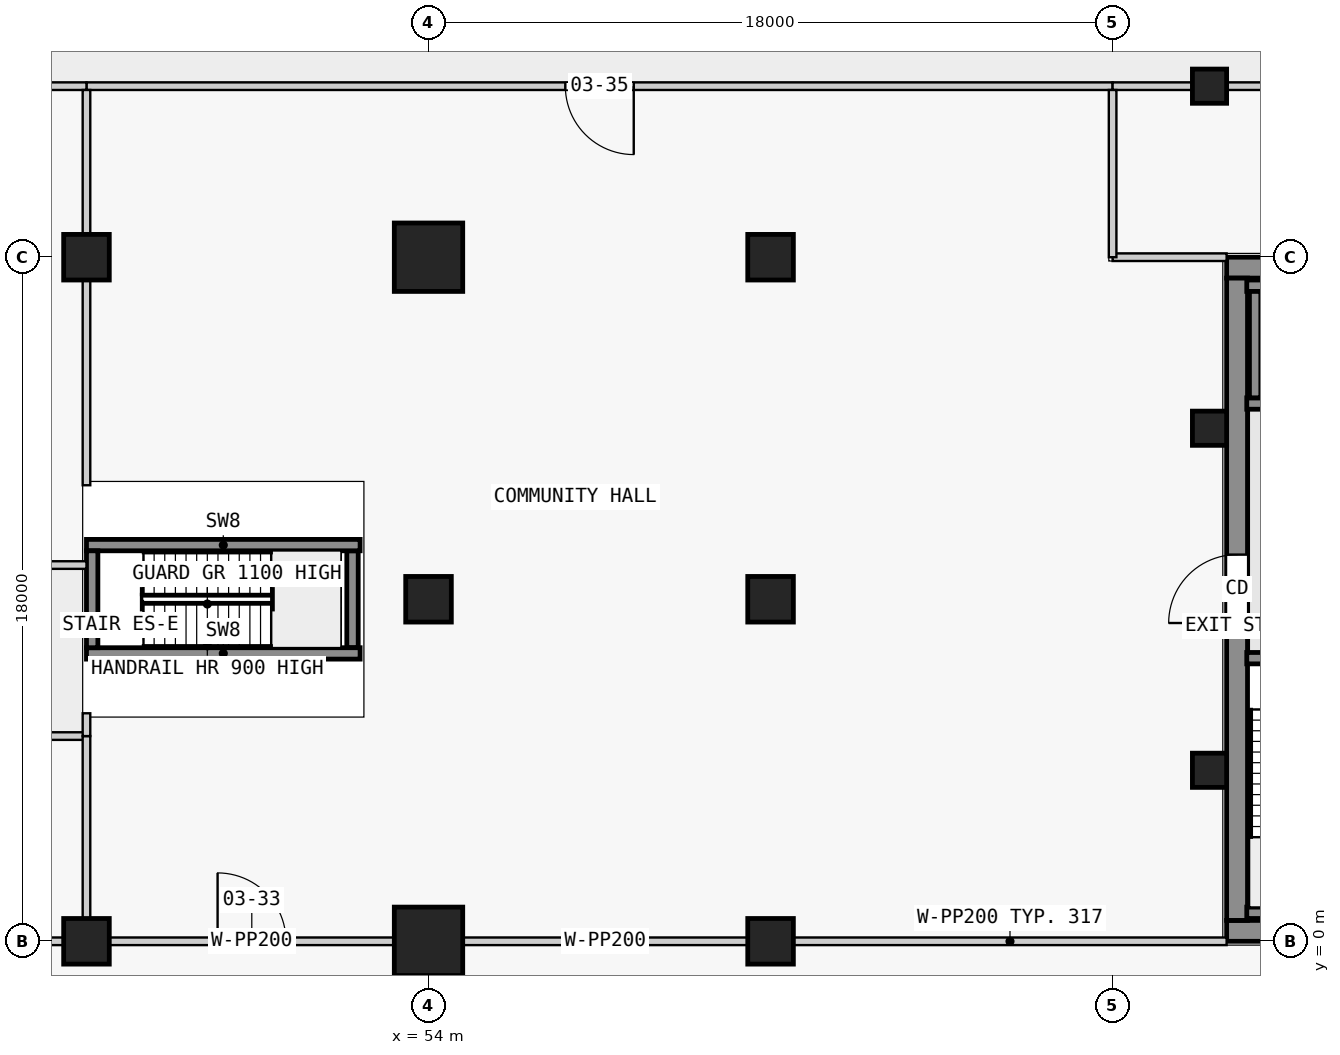
"""IFC4 building model, lengths in metres.
Left out: names, types, materials, properties, quantities, classifications, styles, units other than length and angle.
Written with IfcOpenShell. Run it as: python <this file> out.ifc"""

import sys

from ifc_helpers import new_model, si_unit, direction, frame, frame_2d, origin, origin_2d, place, context, subcontext, project, spatial, rectangle, extrude, element, fill, save


model = new_model("IFC4")
c1 = context("Model", 3, precision=1e-05, world=origin(), true_north=direction((0.0, 1.0)))
c2 = subcontext(c1, "Body", "Model", "MODEL_VIEW")
j1 = project(units=[si_unit("LENGTHUNIT", "METRE"), si_unit("PLANEANGLEUNIT", "RADIAN")], contexts=[c1])
p1 = place(None, origin())
s1 = spatial("IfcSite", under=j1, at=p1, CompositionType="ELEMENT")
p2 = place(p1, origin())
s2 = spatial("IfcBuilding", under=s1, at=p2, CompositionType="ELEMENT")
p3 = place(p2, frame((0.0, 0.0, 17.3)))
s3 = spatial("IfcBuildingStorey", under=s2, at=p3, CompositionType="ELEMENT", Elevation=17.3)
for number, where, z_axis, x_axis in (
    (1, (45.0, 0.0, 0.0), (0.0, 0.0, 1.0), (1.0, 0.0, 0.0)),
    (2, (45.0, 18.0, 0.0), (0.0, 0.0, 1.0), (1.0, 0.0, 0.0)),
):
    element("IfcColumn", number, at=place(p3, frame(where, z_axis=z_axis, x_axis=x_axis)), inside=s3, PredefinedType="COLUMN", context=c2, shape_type="SweptSolid", body=[
        extrude(rectangle(XDim=1.2, YDim=1.2, at=origin_2d()), origin(), (0.0, 0.0, 1.0), 4.5),
    ])
p4 = place(p3, frame((54.0, 0.0, 0.0), z_axis=(0.0, 0.0, 1.0), x_axis=(1.0, 0.0, 0.0)))
e3 = element("IfcColumn", 3, at=p4, inside=s3, PredefinedType="COLUMN", context=c2, shape_type="SweptSolid", body=[
    extrude(rectangle(XDim=1.8, YDim=1.8, at=origin_2d()), origin(), (0.0, 0.0, 1.0), 4.5),
])
p5 = place(p3, frame((54.0, 9.0, 0.0), z_axis=(0.0, 0.0, 1.0), x_axis=(1.0, 0.0, 0.0)))
e4 = element("IfcColumn", 4, at=p5, inside=s3, PredefinedType="COLUMN", context=c2, shape_type="SweptSolid", body=[
    extrude(rectangle(XDim=1.2, YDim=1.2, at=origin_2d()), origin(), (0.0, 0.0, 1.0), 4.5),
])
p6 = place(p3, frame((54.0, 18.0, 0.0), z_axis=(0.0, 0.0, 1.0), x_axis=(1.0, 0.0, 0.0)))
e5 = element("IfcColumn", 5, at=p6, inside=s3, PredefinedType="COLUMN", context=c2, shape_type="SweptSolid", body=[
    extrude(rectangle(XDim=1.8, YDim=1.8, at=origin_2d()), origin(), (0.0, 0.0, 1.0), 4.5),
])
for number, where, z_axis, x_axis in (
    (6, (63.0, 0.0, 0.0), (0.0, 0.0, 1.0), (1.0, 0.0, 0.0)),
    (7, (63.0, 9.0, 0.0), (0.0, 0.0, 1.0), (1.0, 0.0, 0.0)),
    (8, (63.0, 18.0, 0.0), (0.0, 0.0, 1.0), (1.0, 0.0, 0.0)),
):
    element("IfcColumn", number, at=place(p3, frame(where, z_axis=z_axis, x_axis=x_axis)), inside=s3, PredefinedType="COLUMN", context=c2, shape_type="SweptSolid", body=[
        extrude(rectangle(XDim=1.2, YDim=1.2, at=origin_2d()), origin(), (0.0, 0.0, 1.0), 4.5),
    ])
for number, where, z_axis, x_axis in (
    (9, (74.55, 22.5, 0.0), (0.0, 0.0, 1.0), (1.0, 0.0, 0.0)),
    (10, (74.55, 13.5, 0.0), (0.0, 0.0, 1.0), (1.0, 0.0, 0.0)),
    (11, (74.55, 4.5, 0.0), (0.0, 0.0, 1.0), (1.0, 0.0, 0.0)),
):
    element("IfcColumn", number, at=place(p3, frame(where, z_axis=z_axis, x_axis=x_axis)), inside=s3, PredefinedType="COLUMN", context=c2, shape_type="SweptSolid", body=[
        extrude(rectangle(XDim=0.9, YDim=0.9, at=origin_2d()), origin(), (0.0, 0.0, 1.0), 4.5),
    ])
for number, where, z_axis, x_axis in (
    (12, (75.0, 0.275, 0.0), (0.0, 0.0, 1.0), (1.0, 0.0, 0.0)),
    (13, (75.0, 17.725, 0.0), (0.0, 0.0, 1.0), (1.0, 0.0, 0.0)),
):
    element("IfcWall", number, at=place(p3, frame(where, z_axis=z_axis, x_axis=x_axis)), inside=s3, PredefinedType="SHEAR", context=c2, shape_type="SweptSolid", body=[
        extrude(rectangle(XDim=14.5, YDim=0.55, at=frame_2d((7.25, 0.0))), origin(), (0.0, 0.0, 1.0), 4.15),
    ])
p7 = place(p3, frame((75.275, 0.55, 0.0), z_axis=(0.0, 0.0, 1.0), x_axis=(0.0, 1.0, 0.0)))
e14 = element("IfcWall", 14, at=p7, inside=s3, PredefinedType="SHEAR", context=c2, shape_type="SweptSolid", body=[
    extrude(rectangle(XDim=16.9, YDim=0.55, at=frame_2d((8.45, 0.0))), origin(), (0.0, 0.0, 1.0), 4.15),
])
p8 = place(p7, frame((7.825, 0.0, 0.0)))
e15 = element("IfcOpeningElement", 15, at=p8, cuts=e14, PredefinedType="OPENING", context=c2, shape_type="SweptSolid", body=[
    extrude(rectangle(XDim=1.8, YDim=2.1, at=frame_2d((0.9, 1.05))), frame((0.0, 0.285, 0.0), z_axis=(0.0, -1.0, 0.0), x_axis=(1.0, 0.0, 0.0)), (0.0, 0.0, 1.0), 0.57),
])
p9 = place(p3, frame((75.53, 0.75, 0.0), z_axis=(0.0, 0.0, 1.0), x_axis=(1.0, 0.0, 0.0)))
e16 = element("IfcWall", 16, at=p9, inside=s3, PredefinedType="SHEAR", context=c2, shape_type="SweptSolid", body=[
    extrude(rectangle(XDim=5.77, YDim=0.3, at=frame_2d((2.885, 0.0))), origin(), (0.0, 0.0, 1.0), 4.15),
])
p10 = place(p3, frame((75.53, 7.45, 0.0), z_axis=(0.0, 0.0, 1.0), x_axis=(1.0, 0.0, 0.0)))
e17 = element("IfcWall", 17, at=p10, inside=s3, PredefinedType="SHEAR", context=c2, shape_type="SweptSolid", body=[
    extrude(rectangle(XDim=5.77, YDim=0.3, at=frame_2d((2.885, 0.0))), origin(), (0.0, 0.0, 1.0), 4.15),
])
p11 = place(p10, frame((0.75, 0.0, 0.0)))
e18 = element("IfcOpeningElement", 18, at=p11, cuts=e17, PredefinedType="OPENING", context=c2, shape_type="SweptSolid", body=[
    extrude(rectangle(XDim=1.1, YDim=2.1, at=frame_2d((0.55, 1.05))), frame((0.0, 0.16, 0.0), z_axis=(0.0, -1.0, 0.0), x_axis=(1.0, 0.0, 0.0)), (0.0, 0.0, 1.0), 0.32),
])
p12 = place(p10, frame((3.55, 0.0, 0.0)))
e19 = element("IfcOpeningElement", 19, at=p12, cuts=e17, PredefinedType="OPENING", context=c2, shape_type="SweptSolid", body=[
    extrude(rectangle(XDim=1.1, YDim=2.1, at=frame_2d((0.55, 1.05))), frame((0.0, 0.16, 0.0), z_axis=(0.0, -1.0, 0.0), x_axis=(1.0, 0.0, 0.0)), (0.0, 0.0, 1.0), 0.32),
])
p13 = place(p3, frame((75.53, 17.25, 0.0), z_axis=(0.0, 0.0, 1.0), x_axis=(1.0, 0.0, 0.0)))
e20 = element("IfcWall", 20, at=p13, inside=s3, PredefinedType="SHEAR", context=c2, shape_type="SweptSolid", body=[
    extrude(rectangle(XDim=9.97, YDim=0.3, at=frame_2d((4.985, 0.0))), origin(), (0.0, 0.0, 1.0), 4.15),
])
p14 = place(p3, frame((75.53, 14.15, 0.0), z_axis=(0.0, 0.0, 1.0), x_axis=(1.0, 0.0, 0.0)))
e21 = element("IfcWall", 21, at=p14, inside=s3, PredefinedType="SHEAR", context=c2, shape_type="SweptSolid", body=[
    extrude(rectangle(XDim=9.97, YDim=0.3, at=frame_2d((4.985, 0.0))), origin(), (0.0, 0.0, 1.0), 4.15),
])
p15 = place(p14, frame((0.85, 0.0, 0.0)))
e22 = element("IfcOpeningElement", 22, at=p15, cuts=e21, PredefinedType="OPENING", context=c2, shape_type="SweptSolid", body=[
    extrude(rectangle(XDim=1.1, YDim=2.1, at=frame_2d((0.55, 1.05))), frame((0.0, 0.16, 0.0), z_axis=(0.0, -1.0, 0.0), x_axis=(1.0, 0.0, 0.0)), (0.0, 0.0, 1.0), 0.32),
])
p16 = place(p14, frame((3.35, 0.0, 0.0)))
e23 = element("IfcOpeningElement", 23, at=p16, cuts=e21, PredefinedType="OPENING", context=c2, shape_type="SweptSolid", body=[
    extrude(rectangle(XDim=1.1, YDim=2.1, at=frame_2d((0.55, 1.05))), frame((0.0, 0.16, 0.0), z_axis=(0.0, -1.0, 0.0), x_axis=(1.0, 0.0, 0.0)), (0.0, 0.0, 1.0), 0.32),
])
p17 = place(p14, frame((5.75, 0.0, 0.0)))
e24 = element("IfcOpeningElement", 24, at=p17, cuts=e21, PredefinedType="OPENING", context=c2, shape_type="SweptSolid", body=[
    extrude(rectangle(XDim=1.1, YDim=2.1, at=frame_2d((0.55, 1.05))), frame((0.0, 0.16, 0.0), z_axis=(0.0, -1.0, 0.0), x_axis=(1.0, 0.0, 0.0)), (0.0, 0.0, 1.0), 0.32),
])
p18 = place(p14, frame((8.05, 0.0, 0.0)))
e25 = element("IfcOpeningElement", 25, at=p18, cuts=e21, PredefinedType="OPENING", context=c2, shape_type="SweptSolid", body=[
    extrude(rectangle(XDim=1.1, YDim=2.1, at=frame_2d((0.55, 1.05))), frame((0.0, 0.16, 0.0), z_axis=(0.0, -1.0, 0.0), x_axis=(1.0, 0.0, 0.0)), (0.0, 0.0, 1.0), 0.32),
])
p19 = place(p3, frame((75.75, 14.3, 0.0), z_axis=(0.0, 0.0, 1.0), x_axis=(0.0, 1.0, 0.0)))
e26 = element("IfcWall", 26, at=p19, inside=s3, PredefinedType="SHEAR", context=c2, shape_type="SweptSolid", body=[
    extrude(rectangle(XDim=2.8, YDim=0.3, at=frame_2d((1.4, 0.0))), origin(), (0.0, 0.0, 1.0), 4.15),
])
for number, where, z_axis, x_axis in (
    (27, (45.15, 7.725, 0.0), (0.0, 0.0, 1.0), (0.0, 1.0, 0.0)),
    (28, (52.0, 7.725, 0.0), (0.0, 0.0, 1.0), (0.0, 1.0, 0.0)),
):
    element("IfcWall", number, at=place(p3, frame(where, z_axis=z_axis, x_axis=x_axis)), inside=s3, PredefinedType="SHEAR", context=c2, shape_type="SweptSolid", body=[
        extrude(rectangle(XDim=2.55, YDim=0.3, at=frame_2d((1.275, 0.0))), origin(), (0.0, 0.0, 1.0), 4.5),
    ])
for number, where, z_axis, x_axis in (
    (29, (45.0, 7.575, 0.0), (0.0, 0.0, 1.0), (1.0, 0.0, 0.0)),
    (30, (45.0, 10.425, 0.0), (0.0, 0.0, 1.0), (1.0, 0.0, 0.0)),
):
    element("IfcWall", number, at=place(p3, frame(where, z_axis=z_axis, x_axis=x_axis)), inside=s3, PredefinedType="SHEAR", context=c2, shape_type="SweptSolid", body=[
        extrude(rectangle(XDim=7.2, YDim=0.3, at=frame_2d((3.6, 0.0))), origin(), (0.0, 0.0, 1.0), 4.5),
    ])
p20 = place(p3, frame((45.6, 0.0, 0.0), z_axis=(0.0, 0.0, 1.0), x_axis=(1.0, 0.0, 0.0)))
e31 = element("IfcWall", 31, at=p20, inside=s3, PredefinedType="PARTITIONING", context=c2, shape_type="SweptSolid", body=[
    extrude(rectangle(XDim=7.5, YDim=0.2, at=frame_2d((3.75, 0.0))), origin(), (0.0, 0.0, 1.0), 4.15),
])
p21 = place(p20, frame((2.85, 0.0, 0.0)))
e32 = element("IfcOpeningElement", 32, at=p21, cuts=e31, PredefinedType="OPENING", context=c2, shape_type="SweptSolid", body=[
    extrude(rectangle(XDim=1.8, YDim=2.1, at=frame_2d((0.9, 1.05))), frame((0.0, 0.11, 0.0), z_axis=(0.0, -1.0, 0.0), x_axis=(1.0, 0.0, 0.0)), (0.0, 0.0, 1.0), 0.22),
])
p22 = place(p3, frame((54.9, 0.0, 0.0), z_axis=(0.0, 0.0, 1.0), x_axis=(1.0, 0.0, 0.0)))
e33 = element("IfcWall", 33, at=p22, inside=s3, PredefinedType="PARTITIONING", context=c2, shape_type="SweptSolid", body=[
    extrude(rectangle(XDim=7.5, YDim=0.2, at=frame_2d((3.75, 0.0))), origin(), (0.0, 0.0, 1.0), 4.15),
])
p23 = place(p3, frame((63.6, 0.0, 0.0), z_axis=(0.0, 0.0, 1.0), x_axis=(1.0, 0.0, 0.0)))
e34 = element("IfcWall", 34, at=p23, inside=s3, PredefinedType="PARTITIONING", context=c2, shape_type="SweptSolid", body=[
    extrude(rectangle(XDim=11.4, YDim=0.2, at=frame_2d((5.7, 0.0))), origin(), (0.0, 0.0, 1.0), 4.15),
])
p24 = place(p3, frame((72.0, 22.5, 0.0), z_axis=(0.0, 0.0, 1.0), x_axis=(-1.0, 0.0, 0.0)))
e35 = element("IfcWall", 35, at=p24, inside=s3, PredefinedType="PARTITIONING", context=c2, shape_type="SweptSolid", body=[
    extrude(rectangle(XDim=27.0, YDim=0.2, at=frame_2d((13.5, 0.0))), origin(), (0.0, 0.0, 1.0), 4.15),
])
p25 = place(p24, frame((12.6, 0.0, 0.0)))
e36 = element("IfcOpeningElement", 36, at=p25, cuts=e35, PredefinedType="OPENING", context=c2, shape_type="SweptSolid", body=[
    extrude(rectangle(XDim=1.8, YDim=2.1, at=frame_2d((0.9, 1.05))), frame((0.0, 0.11, 0.0), z_axis=(0.0, -1.0, 0.0), x_axis=(1.0, 0.0, 0.0)), (0.0, 0.0, 1.0), 0.22),
])
p26 = place(p3, frame((82.05, 22.5, 0.0), z_axis=(0.0, 0.0, 1.0), x_axis=(-1.0, 0.0, 0.0)))
e37 = element("IfcWall", 37, at=p26, inside=s3, PredefinedType="PARTITIONING", context=c2, shape_type="SweptSolid", body=[
    extrude(rectangle(XDim=7.05, YDim=0.2, at=frame_2d((3.525, 0.0))), origin(), (0.0, 0.0, 1.0), 4.15),
])
p27 = place(p3, frame((74.1, 22.5, 0.0), z_axis=(0.0, 0.0, 1.0), x_axis=(-1.0, 0.0, 0.0)))
e38 = element("IfcWall", 38, at=p27, inside=s3, PredefinedType="PARTITIONING", context=c2, shape_type="SweptSolid", body=[
    extrude(rectangle(XDim=2.1, YDim=0.2, at=frame_2d((1.05, 0.0))), origin(), (0.0, 0.0, 1.0), 4.15),
])
p28 = place(p3, frame((45.0, 22.5, 0.0), z_axis=(0.0, 0.0, 1.0), x_axis=(-1.0, 0.0, 0.0)))
e39 = element("IfcWall", 39, at=p28, inside=s3, PredefinedType="PARTITIONING", context=c2, shape_type="SweptSolid", body=[
    extrude(rectangle(XDim=18.0, YDim=0.2, at=frame_2d((9.0, 0.0))), origin(), (0.0, 0.0, 1.0), 4.15),
])
p29 = place(p28, frame((8.1, 0.0, 0.0)))
e40 = element("IfcOpeningElement", 40, at=p29, cuts=e39, PredefinedType="OPENING", context=c2, shape_type="SweptSolid", body=[
    extrude(rectangle(XDim=1.8, YDim=2.1, at=frame_2d((0.9, 1.05))), frame((0.0, 0.11, 0.0), z_axis=(0.0, -1.0, 0.0), x_axis=(1.0, 0.0, 0.0)), (0.0, 0.0, 1.0), 0.22),
])
p30 = place(p3, frame((36.9, 0.0, 0.0), z_axis=(0.0, 0.0, 1.0), x_axis=(1.0, 0.0, 0.0)))
e41 = element("IfcWall", 41, at=p30, inside=s3, PredefinedType="PARTITIONING", context=c2, shape_type="SweptSolid", body=[
    extrude(rectangle(XDim=7.5, YDim=0.2, at=frame_2d((3.75, 0.0))), origin(), (0.0, 0.0, 1.0), 4.15),
])
p31 = place(p3, frame((27.0, 9.9, 0.0), z_axis=(0.0, 0.0, 1.0), x_axis=(1.0, 0.0, 0.0)))
e42 = element("IfcWall", 42, at=p31, inside=s3, PredefinedType="PARTITIONING", context=c2, shape_type="SweptSolid", body=[
    extrude(rectangle(XDim=18.0, YDim=0.2, at=frame_2d((9.0, 0.0))), origin(), (0.0, 0.0, 1.0), 4.15),
])
p32 = place(p31, frame((6.35, 0.0, 0.0)))
e43 = element("IfcOpeningElement", 43, at=p32, cuts=e42, PredefinedType="OPENING", context=c2, shape_type="SweptSolid", body=[
    extrude(rectangle(XDim=1.8, YDim=2.1, at=frame_2d((0.9, 1.05))), frame((0.0, 0.11, 0.0), z_axis=(0.0, -1.0, 0.0), x_axis=(1.0, 0.0, 0.0)), (0.0, 0.0, 1.0), 0.22),
])
p33 = place(p3, frame((45.0, 5.4, 0.0), z_axis=(0.0, 0.0, 1.0), x_axis=(-1.0, 0.0, 0.0)))
e44 = element("IfcWall", 44, at=p33, inside=s3, PredefinedType="PARTITIONING", context=c2, shape_type="SweptSolid", body=[
    extrude(rectangle(XDim=18.0, YDim=0.2, at=frame_2d((9.0, 0.0))), origin(), (0.0, 0.0, 1.0), 4.15),
])
p34 = place(p3, frame((45.0, 22.4, 0.0), z_axis=(0.0, 0.0, 1.0), x_axis=(0.0, -1.0, 0.0)))
e45 = element("IfcWall", 45, at=p34, inside=s3, PredefinedType="PARTITIONING", context=c2, shape_type="SweptSolid", body=[
    extrude(rectangle(XDim=3.8, YDim=0.2, at=frame_2d((1.9, 0.0))), origin(), (0.0, 0.0, 1.0), 4.15),
])
p35 = place(p3, frame((45.0, 17.4, 0.0), z_axis=(0.0, 0.0, 1.0), x_axis=(0.0, -1.0, 0.0)))
e46 = element("IfcWall", 46, at=p35, inside=s3, PredefinedType="PARTITIONING", context=c2, shape_type="SweptSolid", body=[
    extrude(rectangle(XDim=5.4, YDim=0.2, at=frame_2d((2.7, 0.0))), origin(), (0.0, 0.0, 1.0), 4.15),
])
p36 = place(p3, frame((75.0, 18.0, 0.0), z_axis=(0.0, 0.0, 1.0), x_axis=(-1.0, 0.0, 0.0)))
e47 = element("IfcWall", 47, at=p36, inside=s3, PredefinedType="PARTITIONING", context=c2, shape_type="SweptSolid", body=[
    extrude(rectangle(XDim=3.0, YDim=0.2, at=frame_2d((1.5, 0.0))), origin(), (0.0, 0.0, 1.0), 4.15),
])
p37 = place(p3, frame((72.0, 18.0, 0.0), z_axis=(0.0, 0.0, 1.0), x_axis=(0.0, 1.0, 0.0)))
e48 = element("IfcWall", 48, at=p37, inside=s3, PredefinedType="PARTITIONING", context=c2, shape_type="SweptSolid", body=[
    extrude(rectangle(XDim=4.4, YDim=0.2, at=frame_2d((2.2, 0.0))), origin(), (0.0, 0.0, 1.0), 4.15),
])
p38 = place(p3, frame((45.0, 5.4, 0.0), z_axis=(0.0, 0.0, 1.0), x_axis=(0.0, -1.0, 0.0)))
e49 = element("IfcWall", 49, at=p38, inside=s3, PredefinedType="PARTITIONING", context=c2, shape_type="SweptSolid", body=[
    extrude(rectangle(XDim=4.8, YDim=0.2, at=frame_2d((2.4, 0.0))), origin(), (0.0, 0.0, 1.0), 4.15),
])
p39 = place(p3, frame((45.0, 6.0, 0.0), z_axis=(0.0, 0.0, 1.0), x_axis=(0.0, -1.0, 0.0)))
e50 = element("IfcWall", 50, at=p39, inside=s3, PredefinedType="PARTITIONING", context=c2, shape_type="SweptSolid", body=[
    extrude(rectangle(XDim=0.6, YDim=0.2, at=frame_2d((0.3, 0.0))), origin(), (0.0, 0.0, 1.0), 4.15),
])
p40 = place(p8, origin())
e51 = element("IfcDoor", 51, at=p40, inside=s3, OperationType="DOUBLE_DOOR_SINGLE_SWING", PredefinedType="DOOR", context=c2, shape_type="SweptSolid", body=[
    extrude(rectangle(XDim=1.8, YDim=2.1, at=frame_2d((0.9, 1.05))), frame((0.0, 0.025, 0.0), z_axis=(0.0, -1.0, 0.0), x_axis=(1.0, 0.0, 0.0)), (0.0, 0.0, 1.0), 0.05),
])
fill(e15, e51)
p41 = place(p21, origin())
e52 = element("IfcDoor", 52, at=p41, inside=s3, OperationType="DOUBLE_DOOR_SINGLE_SWING", PredefinedType="DOOR", context=c2, shape_type="SweptSolid", body=[
    extrude(rectangle(XDim=1.8, YDim=2.1, at=frame_2d((0.9, 1.05))), frame((0.0, 0.025, 0.0), z_axis=(0.0, -1.0, 0.0), x_axis=(1.0, 0.0, 0.0)), (0.0, 0.0, 1.0), 0.05),
])
fill(e32, e52)
p42 = place(p25, origin())
e53 = element("IfcDoor", 53, at=p42, inside=s3, OperationType="DOUBLE_DOOR_SINGLE_SWING", PredefinedType="DOOR", context=c2, shape_type="SweptSolid", body=[
    extrude(rectangle(XDim=1.8, YDim=2.1, at=frame_2d((0.9, 1.05))), frame((0.0, 0.025, 0.0), z_axis=(0.0, -1.0, 0.0), x_axis=(1.0, 0.0, 0.0)), (0.0, 0.0, 1.0), 0.05),
])
fill(e36, e53)
save(model, sys.argv[1])
